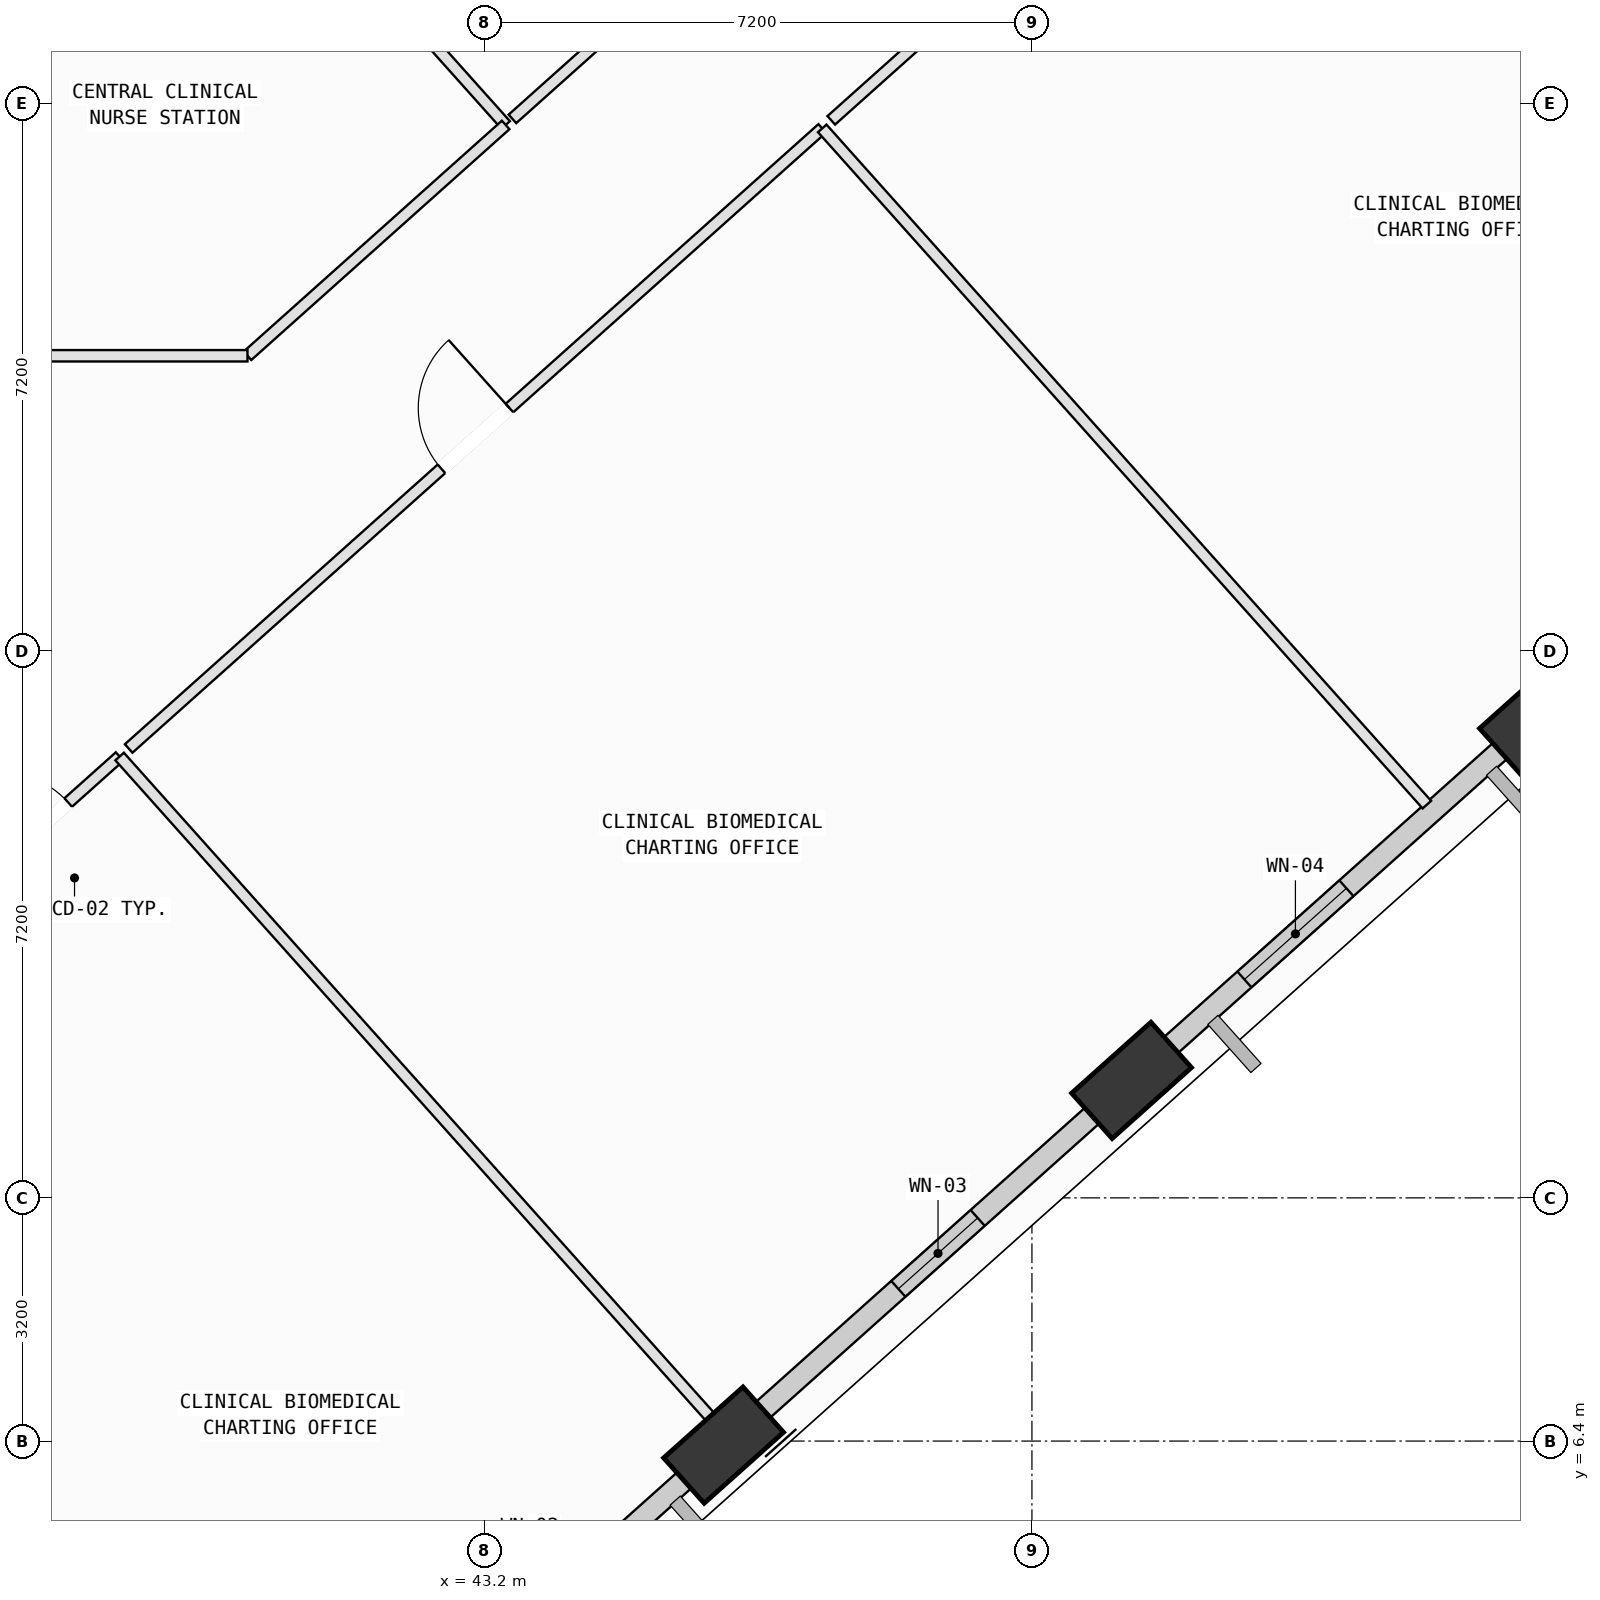
"""IFC4 building model, lengths in metres.
Left out: names, types, materials, properties, quantities, classifications, styles, units other than length and angle.
Written with IfcOpenShell. Run it as: python <this file> out.ifc"""

import sys

from ifc_helpers import new_model, si_unit, direction, frame, frame_2d, origin, origin_2d, place, context, subcontext, project, spatial, rectangle, extrude, element, fill, save


model = new_model("IFC4")
c1 = context("Model", 3, precision=1e-05, world=origin(), true_north=direction((0.0, 1.0)))
c2 = subcontext(c1, "Body", "Model", "MODEL_VIEW")
j1 = project(units=[si_unit("LENGTHUNIT", "METRE"), si_unit("PLANEANGLEUNIT", "RADIAN")], contexts=[c1])
p1 = place(None, origin())
s1 = spatial("IfcSite", under=j1, at=p1, CompositionType="ELEMENT")
p2 = place(p1, origin())
s2 = spatial("IfcBuilding", under=s1, at=p2, CompositionType="ELEMENT")
p3 = place(p2, frame((0.0, 0.0, 201.8)))
s3 = spatial("IfcBuildingStorey", under=s2, at=p3, CompositionType="ELEMENT", Elevation=201.8)
p4 = place(p3, frame((46.343, 6.347, 0.002), z_axis=(0.075683001487, 0.053262996137, 0.995708359174), x_axis=(-0.971780935986, 0.227676829766, 0.061685278981)))
e1 = element("IfcColumn", 1, at=p4, inside=s3, PredefinedType="COLUMN", context=c2, shape_type="SweptSolid", body=[
    extrude(rectangle(XDim=1.4, YDim=0.8, at=origin_2d()), origin(), (0.0, 0.0, 1.0), 3.942),
])
p5 = place(p3, frame((51.71, 11.146, 0.002), z_axis=(0.055748651808, 0.075198736995, 0.995608978352), x_axis=(-0.994064185583, -0.089125763404, 0.06239385577)))
e2 = element("IfcColumn", 2, at=p5, inside=s3, PredefinedType="COLUMN", context=c2, shape_type="SweptSolid", body=[
    extrude(rectangle(XDim=1.4, YDim=0.8, at=origin_2d()), origin(), (0.0, 0.0, 1.0), 3.941),
])
p6 = place(p3, frame((57.078, 15.945, 0.002), z_axis=(0.035710881286, 0.097088958495, 0.994634841083), x_axis=(-0.928505606296, -0.364860270306, 0.068951593376)))
e3 = element("IfcColumn", 3, at=p6, inside=s3, PredefinedType="COLUMN", context=c2, shape_type="SweptSolid", body=[
    extrude(rectangle(XDim=1.4, YDim=0.8, at=origin_2d()), origin(), (0.0, 0.0, 1.0), 3.938),
])
p7 = place(p3, frame((46.111, 6.139, 0.0), z_axis=(0.0, 0.0, 1.0), x_axis=(-0.745487869673, -0.66651919415, 0.0)))
e4 = element("IfcWall", 4, at=p7, inside=s3, PredefinedType="SOLIDWALL", context=c2, shape_type="SweptSolid", body=[
    extrude(rectangle(XDim=6.214, YDim=0.28, at=frame_2d((3.107, 0.0))), origin(), (0.0, 0.0, 1.0), 3.185),
])
p8 = place(p7, frame((2.106, 0.0, 0.75)))
e5 = element("IfcOpeningElement", 5, at=p8, cuts=e4, PredefinedType="OPENING", context=c2, shape_type="SweptSolid", body=[
    extrude(rectangle(XDim=2.0, YDim=1.95, at=frame_2d((1.0, 0.975))), frame((0.0, 0.15, 0.0), z_axis=(0.0, -1.0, 0.0), x_axis=(1.0, 0.0, 0.0)), (0.0, 0.0, 1.0), 0.3),
])
p9 = place(p3, frame((51.479, 10.939, 0.0), z_axis=(0.0, 0.0, 1.0), x_axis=(-0.74547983873, -0.666528176484, 0.0)))
e6 = element("IfcWall", 6, at=p9, inside=s3, PredefinedType="SOLIDWALL", context=c2, shape_type="SweptSolid", body=[
    extrude(rectangle(XDim=6.209, YDim=0.28, at=frame_2d((3.104, 0.0))), origin(), (0.0, 0.0, 1.0), 3.185),
])
p10 = place(p9, frame((2.405, 0.0, 0.75)))
e7 = element("IfcOpeningElement", 7, at=p10, cuts=e6, PredefinedType="OPENING", context=c2, shape_type="SweptSolid", body=[
    extrude(rectangle(XDim=1.4, YDim=1.85, at=frame_2d((0.7, 0.925))), frame((0.0, 0.15, 0.0), z_axis=(0.0, -1.0, 0.0), x_axis=(1.0, 0.0, 0.0)), (0.0, 0.0, 1.0), 0.3),
])
p11 = place(p3, frame((56.852, 15.743, 0.0), z_axis=(0.0, 0.0, 1.0), x_axis=(-0.745463071049, -0.666546929857, 0.0)))
e8 = element("IfcWall", 8, at=p11, inside=s3, PredefinedType="SOLIDWALL", context=c2, shape_type="SweptSolid", body=[
    extrude(rectangle(XDim=6.218, YDim=0.28, at=frame_2d((3.109, 0.0))), origin(), (0.0, 0.0, 1.0), 3.185),
])
p12 = place(p11, frame((3.105, 0.0, 0.75)))
e9 = element("IfcOpeningElement", 9, at=p12, cuts=e8, PredefinedType="OPENING", context=c2, shape_type="SweptSolid", body=[
    extrude(rectangle(XDim=1.8, YDim=2.05, at=frame_2d((0.9, 1.025))), frame((0.0, 0.15, 0.0), z_axis=(0.0, -1.0, 0.0), x_axis=(1.0, 0.0, 0.0)), (0.0, 0.0, 1.0), 0.3),
])
p13 = place(p3, frame((35.176, 24.398, 0.0), z_axis=(0.0, 0.0, 1.0), x_axis=(0.745469496109, 0.66653974403, 0.0)))
e10 = element("IfcWall", 10, at=p13, inside=s3, PredefinedType="SOLIDWALL", context=c2, shape_type="SweptSolid", body=[
    extrude(rectangle(XDim=6.211, YDim=0.28, at=frame_2d((3.105, 0.0))), origin(), (0.0, 0.0, 1.0), 3.185),
])
p14 = place(p13, frame((1.961, 0.0, 0.75)))
e11 = element("IfcOpeningElement", 11, at=p14, cuts=e10, PredefinedType="OPENING", context=c2, shape_type="SweptSolid", body=[
    extrude(rectangle(XDim=1.6, YDim=1.95, at=frame_2d((0.8, 0.975))), frame((0.0, 0.15, 0.0), z_axis=(0.0, -1.0, 0.0), x_axis=(1.0, 0.0, 0.0)), (0.0, 0.0, 1.0), 0.3),
])
p15 = place(p3, frame((36.15, 13.397, 0.0), z_axis=(0.0, 0.0, 1.0), x_axis=(0.745328141311, 0.666697803934, 0.0)))
e12 = element("IfcWall", 12, at=p15, inside=s3, PredefinedType="PARTITIONING", context=c2, shape_type="SweptSolid", body=[
    extrude(rectangle(XDim=3.015, YDim=0.15, at=frame_2d((1.507, 0.0))), origin(), (0.0, 0.0, 1.0), 3.7),
])
p16 = place(p15, frame((0.907, 0.0, 0.0)))
e13 = element("IfcOpeningElement", 13, at=p16, cuts=e12, PredefinedType="OPENING", context=c2, shape_type="SweptSolid", body=[
    extrude(rectangle(XDim=1.2, YDim=2.15, at=frame_2d((0.6, 1.075))), frame((0.0, 0.085, 0.0), z_axis=(0.0, -1.0, 0.0), x_axis=(1.0, 0.0, 0.0)), (0.0, 0.0, 1.0), 0.17),
])
p17 = place(p3, frame((38.397, 15.407, 0.0), z_axis=(0.0, 0.0, 1.0), x_axis=(0.666510643465, -0.745495514505, 0.0)))
e14 = element("IfcWall", 14, at=p17, inside=s3, PredefinedType="PARTITIONING", context=c2, shape_type="SweptSolid", body=[
    extrude(rectangle(XDim=12.281, YDim=0.15, at=frame_2d((6.14, 0.0))), origin(), (0.0, 0.0, 1.0), 3.7),
])
p18 = place(p3, frame((46.582, 6.252, 0.0), z_axis=(0.0, 0.0, 1.0), x_axis=(-0.746049400441, -0.665890600701, 0.0)))
e15 = element("IfcWall", 15, at=p18, inside=s3, PredefinedType="PARTITIONING", context=c2, shape_type="SweptSolid", body=[
    extrude(rectangle(XDim=0.427, YDim=0.15, at=frame_2d((0.213, 0.0))), origin(), (0.0, 0.0, 1.0), 3.185),
])
p19 = place(p3, frame((38.516, 15.513, 0.0), z_axis=(0.0, 0.0, 1.0), x_axis=(0.745456187518, 0.666554628287, 0.0)))
e16 = element("IfcWall", 16, at=p19, inside=s3, PredefinedType="PARTITIONING", context=c2, shape_type="SweptSolid", body=[
    extrude(rectangle(XDim=12.241, YDim=0.15, at=frame_2d((6.12, 0.0))), origin(), (0.0, 0.0, 1.0), 3.7),
])
p20 = place(p19, frame((5.521, 0.0, 0.0)))
e17 = element("IfcOpeningElement", 17, at=p20, cuts=e16, PredefinedType="OPENING", context=c2, shape_type="SweptSolid", body=[
    extrude(rectangle(XDim=1.2, YDim=2.15, at=frame_2d((0.6, 1.075))), frame((0.0, 0.085, 0.0), z_axis=(0.0, -1.0, 0.0), x_axis=(1.0, 0.0, 0.0)), (0.0, 0.0, 1.0), 0.17),
])
p21 = place(p3, frame((47.641, 23.672, 0.0), z_axis=(0.0, 0.0, 1.0), x_axis=(0.666482690368, -0.745520505043, 0.0)))
e18 = element("IfcWall", 18, at=p21, inside=s3, PredefinedType="PARTITIONING", context=c2, shape_type="SweptSolid", body=[
    extrude(rectangle(XDim=11.936, YDim=0.15, at=frame_2d((5.968, 0.0))), origin(), (0.0, 0.0, 1.0), 3.7),
])
p22 = place(p3, frame((52.37, 11.427, 0.0), z_axis=(0.0, 0.0, 1.0), x_axis=(-0.745950796246, -0.666001058243, 0.0)))
e19 = element("IfcWall", 19, at=p22, inside=s3, PredefinedType="PARTITIONING", context=c2, shape_type="SweptSolid", body=[
    extrude(rectangle(XDim=0.99, YDim=0.15, at=frame_2d((0.495, 0.0))), origin(), (0.0, 0.0, 1.0), 3.185),
])
p23 = place(p3, frame((47.76, 23.778, 0.0), z_axis=(0.0, 0.0, 1.0), x_axis=(0.745466097876, 0.666543544652, 0.0)))
e20 = element("IfcWall", 20, at=p23, inside=s3, PredefinedType="PARTITIONING", context=c2, shape_type="SweptSolid", body=[
    extrude(rectangle(XDim=12.241, YDim=0.15, at=frame_2d((6.12, 0.0))), origin(), (0.0, 0.0, 1.0), 2.985),
])
p24 = place(p23, frame((5.521, 0.0, 0.0)))
e21 = element("IfcOpeningElement", 21, at=p24, cuts=e20, PredefinedType="OPENING", context=c2, shape_type="SweptSolid", body=[
    extrude(rectangle(XDim=1.2, YDim=2.15, at=frame_2d((0.6, 1.075))), frame((0.0, 0.085, 0.0), z_axis=(0.0, -1.0, 0.0), x_axis=(1.0, 0.0, 0.0)), (0.0, 0.0, 1.0), 0.17),
])
p25 = place(p3, frame((30.08, 20.58, 0.0), z_axis=(0.0, 0.0, 1.0), x_axis=(0.745505625265, 0.666499334357, 0.0)))
e22 = element("IfcWall", 22, at=p25, inside=s3, PredefinedType="PARTITIONING", context=c2, shape_type="SweptSolid", body=[
    extrude(rectangle(XDim=12.076, YDim=0.15, at=frame_2d((6.038, 0.0))), origin(), (0.0, 0.0, 1.0), 3.7),
])
p26 = place(p3, frame((39.526, 28.133, 0.0), z_axis=(0.0, 0.0, 1.0), x_axis=(0.666703315067, -0.745323211553, 0.0)))
e23 = element("IfcWall", 23, at=p26, inside=s3, PredefinedType="PARTITIONING", context=c2, shape_type="SweptSolid", body=[
    extrude(rectangle(XDim=5.925, YDim=0.15, at=frame_2d((2.962, 0.0))), origin(), (0.0, 0.0, 1.0), 3.7),
])
p27 = place(p3, frame((43.476, 23.717, 0.0), z_axis=(0.0, 0.0, 1.0), x_axis=(-0.745490689722, -0.66651603997, 0.0)))
e24 = element("IfcWall", 24, at=p27, inside=s3, PredefinedType="PARTITIONING", context=c2, shape_type="SweptSolid", body=[
    extrude(rectangle(XDim=4.557, YDim=0.15, at=frame_2d((2.278, 0.0))), origin(), (0.0, 0.0, 1.0), 3.7),
])
p28 = place(p3, frame((40.079, 20.68, 0.0), z_axis=(0.0, 0.0, 1.0), x_axis=(-1.0, 0.0, 0.0)))
e25 = element("IfcWall", 25, at=p28, inside=s3, PredefinedType="PARTITIONING", context=c2, shape_type="SweptSolid", body=[
    extrude(rectangle(XDim=8.882, YDim=0.15, at=frame_2d((4.441, 0.0))), origin(), (0.0, 0.0, 1.0), 3.7),
])
p29 = place(p28, frame((3.841, 0.0, 0.0)))
e26 = element("IfcOpeningElement", 26, at=p29, cuts=e25, PredefinedType="OPENING", context=c2, shape_type="SweptSolid", body=[
    extrude(rectangle(XDim=1.2, YDim=2.15, at=frame_2d((0.6, 1.075))), frame((0.0, 0.085, 0.0), z_axis=(0.0, -1.0, 0.0), x_axis=(1.0, 0.0, 0.0)), (0.0, 0.0, 1.0), 0.17),
])
p30 = place(p3, frame((54.902, 33.933, 0.0), z_axis=(0.0, 0.0, 1.0), x_axis=(-0.745495701488, -0.666510434324, 0.0)))
e27 = element("IfcWall", 27, at=p30, inside=s3, PredefinedType="PARTITIONING", context=c2, shape_type="SweptSolid", body=[
    extrude(rectangle(XDim=15.208, YDim=0.15, at=frame_2d((7.604, 0.0))), origin(), (0.0, 0.0, 1.0), 3.7),
])
p31 = place(p30, frame((7.004, 0.0, 0.0)))
e28 = element("IfcOpeningElement", 28, at=p31, cuts=e27, PredefinedType="OPENING", context=c2, shape_type="SweptSolid", body=[
    extrude(rectangle(XDim=1.2, YDim=2.15, at=frame_2d((0.6, 1.075))), frame((0.0, 0.085, 0.0), z_axis=(0.0, -1.0, 0.0), x_axis=(1.0, 0.0, 0.0)), (0.0, 0.0, 1.0), 0.17),
])
p32 = place(p10, origin())
e29 = element("IfcWindow", 29, at=p32, inside=s3, PartitioningType="SINGLE_PANEL", PredefinedType="WINDOW", context=c2, shape_type="SweptSolid", body=[
    extrude(rectangle(XDim=1.4, YDim=1.85, at=frame_2d((0.7, 0.925))), frame((0.0, 0.03, 0.0), z_axis=(0.0, -1.0, 0.0), x_axis=(1.0, 0.0, 0.0)), (0.0, 0.0, 1.0), 0.06),
])
fill(e7, e29)
p33 = place(p12, origin())
e30 = element("IfcWindow", 30, at=p33, inside=s3, PartitioningType="SINGLE_PANEL", PredefinedType="WINDOW", context=c2, shape_type="SweptSolid", body=[
    extrude(rectangle(XDim=1.8, YDim=2.05, at=frame_2d((0.9, 1.025))), frame((0.0, 0.03, 0.0), z_axis=(0.0, -1.0, 0.0), x_axis=(1.0, 0.0, 0.0)), (0.0, 0.0, 1.0), 0.06),
])
fill(e9, e30)
p34 = place(p16, origin())
e31 = element("IfcDoor", 31, at=p34, inside=s3, OperationType="SINGLE_SWING_LEFT", PredefinedType="DOOR", context=c2, shape_type="SweptSolid", body=[
    extrude(rectangle(XDim=1.2, YDim=2.15, at=frame_2d((0.6, 1.075))), frame((0.0, 0.025, 0.0), z_axis=(0.0, -1.0, 0.0), x_axis=(1.0, 0.0, 0.0)), (0.0, 0.0, 1.0), 0.05),
])
fill(e13, e31)
p35 = place(p20, origin())
e32 = element("IfcDoor", 32, at=p35, inside=s3, OperationType="SINGLE_SWING_RIGHT", PredefinedType="DOOR", context=c2, shape_type="SweptSolid", body=[
    extrude(rectangle(XDim=1.2, YDim=2.15, at=frame_2d((0.6, 1.075))), frame((0.0, 0.025, 0.0), z_axis=(0.0, -1.0, 0.0), x_axis=(1.0, 0.0, 0.0)), (0.0, 0.0, 1.0), 0.05),
])
fill(e17, e32)
save(model, sys.argv[1])
